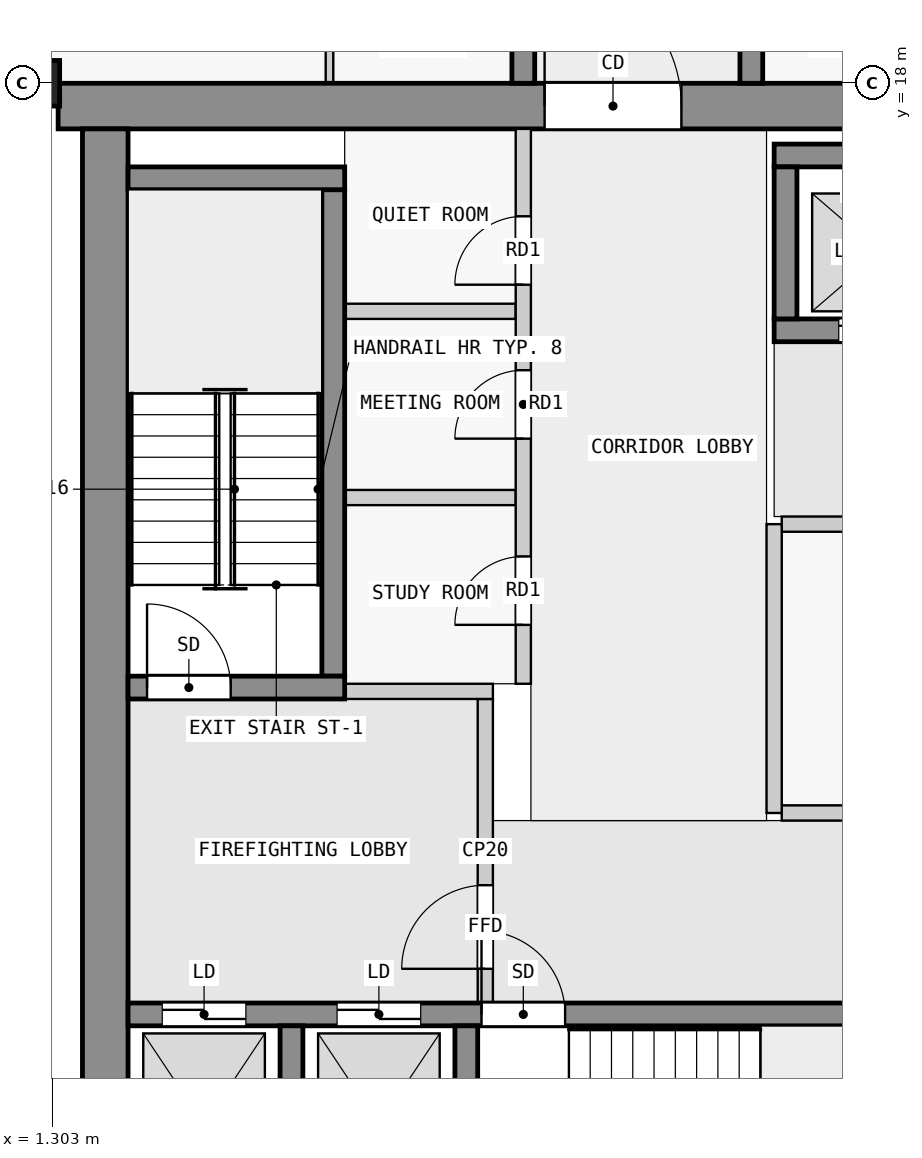
"""IFC4 building model, lengths in metres.
Left out: names, types, materials, properties, quantities, classifications, styles, units other than length and angle.
Written with IfcOpenShell. Run it as: python <this file> out.ifc"""

import sys

from ifc_helpers import new_model, si_unit, direction, frame, frame_2d, origin, origin_2d, place, context, subcontext, project, spatial, rectangle, extrude, element, fill, save


model = new_model("IFC4")
c1 = context("Model", 3, precision=1e-05, world=origin(), true_north=direction((0.0, 1.0)))
c2 = subcontext(c1, "Body", "Model", "MODEL_VIEW")
j1 = project(units=[si_unit("LENGTHUNIT", "METRE"), si_unit("PLANEANGLEUNIT", "RADIAN")], contexts=[c1])
p1 = place(None, origin())
s1 = spatial("IfcSite", under=j1, at=p1, CompositionType="ELEMENT")
p2 = place(p1, origin())
s2 = spatial("IfcBuilding", under=s1, at=p2, CompositionType="ELEMENT")
p3 = place(p2, frame((0.0, 0.0, 170.9)))
s3 = spatial("IfcBuildingStorey", under=s2, at=p3, CompositionType="ELEMENT", Elevation=170.9)
p4 = place(p3, frame((0.7, 18.0, 0.0), z_axis=(0.0, 0.0, 1.0), x_axis=(0.0, 1.0, 0.0)))
e1 = element("IfcColumn", 1, at=p4, inside=s3, PredefinedType="COLUMN", context=c2, shape_type="SweptSolid", body=[
    extrude(rectangle(XDim=0.6, YDim=1.4, at=origin_2d()), origin(), (0.0, 0.0, 1.0), 3.5),
])
p5 = place(p3, frame((1.38, 17.7, 0.0), z_axis=(0.0, 0.0, 1.0), x_axis=(1.0, 0.0, 0.0)))
e2 = element("IfcWall", 2, at=p5, inside=s3, PredefinedType="SHEAR", context=c2, shape_type="SweptSolid", body=[
    extrude(rectangle(XDim=21.12, YDim=0.6, at=frame_2d((10.56, 0.0))), origin(), (0.0, 0.0, 1.0), 3.25),
])
p6 = place(p5, frame((6.4, 0.0, 0.0)))
e3 = element("IfcOpeningElement", 3, at=p6, cuts=e2, PredefinedType="OPENING", context=c2, shape_type="SweptSolid", body=[
    extrude(rectangle(XDim=1.8, YDim=2.1, at=frame_2d((0.9, 1.05))), frame((0.0, 0.31, 0.0), z_axis=(0.0, -1.0, 0.0), x_axis=(1.0, 0.0, 0.0)), (0.0, 0.0, 1.0), 0.62),
])
p7 = place(p3, frame((2.0, 2.5, 0.0), z_axis=(0.0, 0.0, 1.0), x_axis=(0.0, 1.0, 0.0)))
e4 = element("IfcWall", 4, at=p7, inside=s3, PredefinedType="SHEAR", context=c2, shape_type="SweptSolid", body=[
    extrude(rectangle(XDim=14.9, YDim=0.6, at=frame_2d((7.45, 0.0))), origin(), (0.0, 0.0, 1.0), 3.25),
])
for number, where, z_axis, x_axis in (
    (5, (4.45, 2.8, 0.0), (0.0, 0.0, 1.0), (0.0, 1.0, 0.0)),
    (6, (6.75, 2.8, 0.0), (0.0, 0.0, 1.0), (0.0, 1.0, 0.0)),
):
    element("IfcWall", number, at=place(p3, frame(where, z_axis=z_axis, x_axis=x_axis)), inside=s3, PredefinedType="SHEAR", context=c2, shape_type="SweptSolid", body=[
        extrude(rectangle(XDim=2.8, YDim=0.3, at=frame_2d((1.4, 0.0))), origin(), (0.0, 0.0, 1.0), 3.25),
    ])
p8 = place(p3, frame((2.3, 5.75, 0.0), z_axis=(0.0, 0.0, 1.0), x_axis=(1.0, 0.0, 0.0)))
e7 = element("IfcWall", 7, at=p8, inside=s3, PredefinedType="SHEAR", context=c2, shape_type="SweptSolid", body=[
    extrude(rectangle(XDim=18.8, YDim=0.3, at=frame_2d((9.4, 0.0))), origin(), (0.0, 0.0, 1.0), 3.25),
])
p9 = place(p8, frame((4.65, 0.0, 0.0)))
e8 = element("IfcOpeningElement", 8, at=p9, cuts=e7, PredefinedType="OPENING", context=c2, shape_type="SweptSolid", body=[
    extrude(rectangle(XDim=1.1, YDim=2.1, at=frame_2d((0.55, 1.05))), frame((0.0, 0.16, 0.0), z_axis=(0.0, -1.0, 0.0), x_axis=(1.0, 0.0, 0.0)), (0.0, 0.0, 1.0), 0.32),
])
p10 = place(p8, frame((0.45, 0.0, 0.0)))
e9 = element("IfcOpeningElement", 9, at=p10, cuts=e7, PredefinedType="OPENING", context=c2, shape_type="SweptSolid", body=[
    extrude(rectangle(XDim=1.1, YDim=2.1, at=frame_2d((0.55, 1.05))), frame((0.0, 0.16, 0.0), z_axis=(0.0, -1.0, 0.0), x_axis=(1.0, 0.0, 0.0)), (0.0, 0.0, 1.0), 0.32),
])
p11 = place(p8, frame((2.75, 0.0, 0.0)))
e10 = element("IfcOpeningElement", 10, at=p11, cuts=e7, PredefinedType="OPENING", context=c2, shape_type="SweptSolid", body=[
    extrude(rectangle(XDim=1.1, YDim=2.1, at=frame_2d((0.55, 1.05))), frame((0.0, 0.16, 0.0), z_axis=(0.0, -1.0, 0.0), x_axis=(1.0, 0.0, 0.0)), (0.0, 0.0, 1.0), 0.32),
])
p12 = place(p8, frame((13.2, 0.0, 0.0)))
e11 = element("IfcOpeningElement", 11, at=p12, cuts=e7, PredefinedType="OPENING", context=c2, shape_type="SweptSolid", body=[
    extrude(rectangle(XDim=0.9, YDim=2.1, at=frame_2d((0.45, 1.05))), frame((0.0, 0.16, 0.0), z_axis=(0.0, -1.0, 0.0), x_axis=(1.0, 0.0, 0.0)), (0.0, 0.0, 1.0), 0.32),
])
p13 = place(p8, frame((16.95, 0.0, 0.0)))
e12 = element("IfcOpeningElement", 12, at=p13, cuts=e7, PredefinedType="OPENING", context=c2, shape_type="SweptSolid", body=[
    extrude(rectangle(XDim=0.9, YDim=2.1, at=frame_2d((0.45, 1.05))), frame((0.0, 0.16, 0.0), z_axis=(0.0, -1.0, 0.0), x_axis=(1.0, 0.0, 0.0)), (0.0, 0.0, 1.0), 0.32),
])
p14 = place(p3, frame((2.3, 10.05, 0.0), z_axis=(0.0, 0.0, 1.0), x_axis=(1.0, 0.0, 0.0)))
e13 = element("IfcWall", 13, at=p14, inside=s3, PredefinedType="SHEAR", context=c2, shape_type="SweptSolid", body=[
    extrude(rectangle(XDim=2.85, YDim=0.3, at=frame_2d((1.425, 0.0))), origin(), (0.0, 0.0, 1.0), 3.25),
])
p15 = place(p14, frame((0.25, 0.0, 0.0)))
e14 = element("IfcOpeningElement", 14, at=p15, cuts=e13, PredefinedType="OPENING", context=c2, shape_type="SweptSolid", body=[
    extrude(rectangle(XDim=1.1, YDim=2.1, at=frame_2d((0.55, 1.05))), frame((0.0, 0.16, 0.0), z_axis=(0.0, -1.0, 0.0), x_axis=(1.0, 0.0, 0.0)), (0.0, 0.0, 1.0), 0.32),
])
p16 = place(p3, frame((5.0, 10.2, 0.0), z_axis=(0.0, 0.0, 1.0), x_axis=(0.0, 1.0, 0.0)))
e15 = element("IfcWall", 15, at=p16, inside=s3, PredefinedType="SHEAR", context=c2, shape_type="SweptSolid", body=[
    extrude(rectangle(XDim=6.4, YDim=0.3, at=frame_2d((3.2, 0.0))), origin(), (0.0, 0.0, 1.0), 3.25),
])
p17 = place(p3, frame((2.3, 16.75, 0.0), z_axis=(0.0, 0.0, 1.0), x_axis=(1.0, 0.0, 0.0)))
e16 = element("IfcWall", 16, at=p17, inside=s3, PredefinedType="SHEAR", context=c2, shape_type="SweptSolid", body=[
    extrude(rectangle(XDim=2.85, YDim=0.3, at=frame_2d((1.425, 0.0))), origin(), (0.0, 0.0, 1.0), 3.25),
])
p18 = place(p3, frame((10.8, 17.05, 0.0), z_axis=(0.0, 0.0, 1.0), x_axis=(1.0, 0.0, 0.0)))
e17 = element("IfcWall", 17, at=p18, inside=s3, PredefinedType="SHEAR", context=c2, shape_type="SweptSolid", body=[
    extrude(rectangle(XDim=7.8, YDim=0.3, at=frame_2d((3.9, 0.0))), origin(), (0.0, 0.0, 1.0), 3.25),
])
p19 = place(p3, frame((10.8, 14.75, 0.0), z_axis=(0.0, 0.0, 1.0), x_axis=(1.0, 0.0, 0.0)))
e18 = element("IfcWall", 18, at=p19, inside=s3, PredefinedType="SHEAR", context=c2, shape_type="SweptSolid", body=[
    extrude(rectangle(XDim=7.8, YDim=0.3, at=frame_2d((3.9, 0.0))), origin(), (0.0, 0.0, 1.0), 3.25),
])
p20 = place(p19, frame((0.85, 0.0, 0.0)))
e19 = element("IfcOpeningElement", 19, at=p20, cuts=e18, PredefinedType="OPENING", context=c2, shape_type="SweptSolid", body=[
    extrude(rectangle(XDim=1.1, YDim=2.1, at=frame_2d((0.55, 1.05))), frame((0.0, 0.16, 0.0), z_axis=(0.0, -1.0, 0.0), x_axis=(1.0, 0.0, 0.0)), (0.0, 0.0, 1.0), 0.32),
])
p21 = place(p19, frame((3.35, 0.0, 0.0)))
e20 = element("IfcOpeningElement", 20, at=p21, cuts=e18, PredefinedType="OPENING", context=c2, shape_type="SweptSolid", body=[
    extrude(rectangle(XDim=1.1, YDim=2.1, at=frame_2d((0.55, 1.05))), frame((0.0, 0.16, 0.0), z_axis=(0.0, -1.0, 0.0), x_axis=(1.0, 0.0, 0.0)), (0.0, 0.0, 1.0), 0.32),
])
p22 = place(p19, frame((5.85, 0.0, 0.0)))
e21 = element("IfcOpeningElement", 21, at=p22, cuts=e18, PredefinedType="OPENING", context=c2, shape_type="SweptSolid", body=[
    extrude(rectangle(XDim=1.1, YDim=2.1, at=frame_2d((0.55, 1.05))), frame((0.0, 0.16, 0.0), z_axis=(0.0, -1.0, 0.0), x_axis=(1.0, 0.0, 0.0)), (0.0, 0.0, 1.0), 0.32),
])
p23 = place(p3, frame((10.95, 14.9, 0.0), z_axis=(0.0, 0.0, 1.0), x_axis=(0.0, 1.0, 0.0)))
e22 = element("IfcWall", 22, at=p23, inside=s3, PredefinedType="SHEAR", context=c2, shape_type="SweptSolid", body=[
    extrude(rectangle(XDim=2.0, YDim=0.3, at=frame_2d((1.0, 0.0))), origin(), (0.0, 0.0, 1.0), 3.25),
])
p24 = place(p3, frame((7.5, 18.0, 0.0), z_axis=(0.0, 0.0, 1.0), x_axis=(0.0, 1.0, 0.0)))
e23 = element("IfcWall", 23, at=p24, inside=s3, PredefinedType="SHEAR", context=c2, shape_type="SweptSolid", body=[
    extrude(rectangle(XDim=27.0, YDim=0.3, at=frame_2d((13.5, 0.0))), origin(), (0.0, 0.0, 1.0), 3.25),
])
p25 = place(p24, frame((1.75, 0.0, 0.0)))
e24 = element("IfcOpeningElement", 24, at=p25, cuts=e23, PredefinedType="OPENING", context=c2, shape_type="SweptSolid", body=[
    extrude(rectangle(XDim=1.0, YDim=2.1, at=frame_2d((0.5, 1.05))), frame((0.0, 0.16, 0.0), z_axis=(0.0, -1.0, 0.0), x_axis=(1.0, 0.0, 0.0)), (0.0, 0.0, 1.0), 0.32),
])
p26 = place(p24, frame((5.85, 0.0, 0.0)))
e25 = element("IfcOpeningElement", 25, at=p26, cuts=e23, PredefinedType="OPENING", context=c2, shape_type="SweptSolid", body=[
    extrude(rectangle(XDim=1.8, YDim=2.1, at=frame_2d((0.9, 1.05))), frame((0.0, 0.16, 0.0), z_axis=(0.0, -1.0, 0.0), x_axis=(1.0, 0.0, 0.0)), (0.0, 0.0, 1.0), 0.32),
])
p27 = place(p24, frame((13.05, 0.0, 0.0)))
e26 = element("IfcOpeningElement", 26, at=p27, cuts=e23, PredefinedType="OPENING", context=c2, shape_type="SweptSolid", body=[
    extrude(rectangle(XDim=1.0, YDim=2.1, at=frame_2d((0.5, 1.05))), frame((0.0, 0.16, 0.0), z_axis=(0.0, -1.0, 0.0), x_axis=(1.0, 0.0, 0.0)), (0.0, 0.0, 1.0), 0.32),
])
p28 = place(p24, frame((21.35, 0.0, 0.0)))
e27 = element("IfcOpeningElement", 27, at=p28, cuts=e23, PredefinedType="OPENING", context=c2, shape_type="SweptSolid", body=[
    extrude(rectangle(XDim=1.0, YDim=2.1, at=frame_2d((0.5, 1.05))), frame((0.0, 0.16, 0.0), z_axis=(0.0, -1.0, 0.0), x_axis=(1.0, 0.0, 0.0)), (0.0, 0.0, 1.0), 0.32),
])
p29 = place(p3, frame((10.5, 18.0, 0.0), z_axis=(0.0, 0.0, 1.0), x_axis=(0.0, 1.0, 0.0)))
e28 = element("IfcWall", 28, at=p29, inside=s3, PredefinedType="SHEAR", context=c2, shape_type="SweptSolid", body=[
    extrude(rectangle(XDim=27.0, YDim=0.3, at=frame_2d((13.5, 0.0))), origin(), (0.0, 0.0, 1.0), 3.25),
])
p30 = place(p29, frame((1.75, 0.0, 0.0)))
e29 = element("IfcOpeningElement", 29, at=p30, cuts=e28, PredefinedType="OPENING", context=c2, shape_type="SweptSolid", body=[
    extrude(rectangle(XDim=1.0, YDim=2.1, at=frame_2d((0.5, 1.05))), frame((0.0, 0.16, 0.0), z_axis=(0.0, -1.0, 0.0), x_axis=(1.0, 0.0, 0.0)), (0.0, 0.0, 1.0), 0.32),
])
p31 = place(p29, frame((6.25, 0.0, 0.0)))
e30 = element("IfcOpeningElement", 30, at=p31, cuts=e28, PredefinedType="OPENING", context=c2, shape_type="SweptSolid", body=[
    extrude(rectangle(XDim=1.0, YDim=2.1, at=frame_2d((0.5, 1.05))), frame((0.0, 0.16, 0.0), z_axis=(0.0, -1.0, 0.0), x_axis=(1.0, 0.0, 0.0)), (0.0, 0.0, 1.0), 0.32),
])
p32 = place(p29, frame((10.75, 0.0, 0.0)))
e31 = element("IfcOpeningElement", 31, at=p32, cuts=e28, PredefinedType="OPENING", context=c2, shape_type="SweptSolid", body=[
    extrude(rectangle(XDim=1.0, YDim=2.1, at=frame_2d((0.5, 1.05))), frame((0.0, 0.16, 0.0), z_axis=(0.0, -1.0, 0.0), x_axis=(1.0, 0.0, 0.0)), (0.0, 0.0, 1.0), 0.32),
])
p33 = place(p29, frame((15.25, 0.0, 0.0)))
e32 = element("IfcOpeningElement", 32, at=p33, cuts=e28, PredefinedType="OPENING", context=c2, shape_type="SweptSolid", body=[
    extrude(rectangle(XDim=1.0, YDim=2.1, at=frame_2d((0.5, 1.05))), frame((0.0, 0.16, 0.0), z_axis=(0.0, -1.0, 0.0), x_axis=(1.0, 0.0, 0.0)), (0.0, 0.0, 1.0), 0.32),
])
p34 = place(p29, frame((19.75, 0.0, 0.0)))
e33 = element("IfcOpeningElement", 33, at=p34, cuts=e28, PredefinedType="OPENING", context=c2, shape_type="SweptSolid", body=[
    extrude(rectangle(XDim=1.0, YDim=2.1, at=frame_2d((0.5, 1.05))), frame((0.0, 0.16, 0.0), z_axis=(0.0, -1.0, 0.0), x_axis=(1.0, 0.0, 0.0)), (0.0, 0.0, 1.0), 0.32),
])
p35 = place(p29, frame((23.25, 0.0, 0.0)))
e34 = element("IfcOpeningElement", 34, at=p35, cuts=e28, PredefinedType="OPENING", context=c2, shape_type="SweptSolid", body=[
    extrude(rectangle(XDim=0.9, YDim=2.1, at=frame_2d((0.45, 1.05))), frame((0.0, 0.16, 0.0), z_axis=(0.0, -1.0, 0.0), x_axis=(1.0, 0.0, 0.0)), (0.0, 0.0, 1.0), 0.32),
])
p36 = place(p29, frame((25.45, 0.0, 0.0)))
e35 = element("IfcOpeningElement", 35, at=p36, cuts=e28, PredefinedType="OPENING", context=c2, shape_type="SweptSolid", body=[
    extrude(rectangle(XDim=1.0, YDim=2.1, at=frame_2d((0.5, 1.05))), frame((0.0, 0.16, 0.0), z_axis=(0.0, -1.0, 0.0), x_axis=(1.0, 0.0, 0.0)), (0.0, 0.0, 1.0), 0.32),
])
p37 = place(p3, frame((7.0, 5.9, 0.0), z_axis=(0.0, 0.0, 1.0), x_axis=(0.0, 1.0, 0.0)))
e36 = element("IfcWall", 36, at=p37, inside=s3, PredefinedType="PARTITIONING", context=c2, shape_type="SweptSolid", body=[
    extrude(rectangle(XDim=4.0, YDim=0.2, at=frame_2d((2.0, 0.0))), origin(), (0.0, 0.0, 1.0), 3.25),
])
p38 = place(p37, frame((0.45, 0.0, 0.0)))
e37 = element("IfcOpeningElement", 37, at=p38, cuts=e36, PredefinedType="OPENING", context=c2, shape_type="SweptSolid", body=[
    extrude(rectangle(XDim=1.1, YDim=2.1, at=frame_2d((0.55, 1.05))), frame((0.0, 0.11, 0.0), z_axis=(0.0, -1.0, 0.0), x_axis=(1.0, 0.0, 0.0)), (0.0, 0.0, 1.0), 0.22),
])
p39 = place(p3, frame((5.15, 10.0, 0.0), z_axis=(0.0, 0.0, 1.0), x_axis=(1.0, 0.0, 0.0)))
e38 = element("IfcWall", 38, at=p39, inside=s3, PredefinedType="PARTITIONING", context=c2, shape_type="SweptSolid", body=[
    extrude(rectangle(XDim=1.95, YDim=0.2, at=frame_2d((0.975, 0.0))), origin(), (0.0, 0.0, 1.0), 3.25),
])
p40 = place(p3, frame((10.8, 8.4, 0.0), z_axis=(0.0, 0.0, 1.0), x_axis=(0.0, 1.0, 0.0)))
e39 = element("IfcWall", 39, at=p40, inside=s3, PredefinedType="PARTITIONING", context=c2, shape_type="SweptSolid", body=[
    extrude(rectangle(XDim=3.8, YDim=0.2, at=frame_2d((1.9, 0.0))), origin(), (0.0, 0.0, 1.0), 3.25),
])
p41 = place(p3, frame((10.9, 8.4, 0.0), z_axis=(0.0, 0.0, 1.0), x_axis=(1.0, 0.0, 0.0)))
e40 = element("IfcWall", 40, at=p41, inside=s3, PredefinedType="PARTITIONING", context=c2, shape_type="SweptSolid", body=[
    extrude(rectangle(XDim=8.5, YDim=0.2, at=frame_2d((4.25, 0.0))), origin(), (0.0, 0.0, 1.0), 3.25),
])
p42 = place(p3, frame((10.9, 12.2, 0.0), z_axis=(0.0, 0.0, 1.0), x_axis=(1.0, 0.0, 0.0)))
e41 = element("IfcWall", 41, at=p42, inside=s3, PredefinedType="PARTITIONING", context=c2, shape_type="SweptSolid", body=[
    extrude(rectangle(XDim=8.5, YDim=0.2, at=frame_2d((4.25, 0.0))), origin(), (0.0, 0.0, 1.0), 3.25),
])
p43 = place(p42, frame((3.8, 0.0, 0.0)))
e42 = element("IfcOpeningElement", 42, at=p43, cuts=e41, PredefinedType="OPENING", context=c2, shape_type="SweptSolid", body=[
    extrude(rectangle(XDim=0.9, YDim=2.1, at=frame_2d((0.45, 1.05))), frame((0.0, 0.11, 0.0), z_axis=(0.0, -1.0, 0.0), x_axis=(1.0, 0.0, 0.0)), (0.0, 0.0, 1.0), 0.22),
])
p44 = place(p3, frame((7.5, 10.1, 0.0), z_axis=(0.0, 0.0, 1.0), x_axis=(0.0, 1.0, 0.0)))
e43 = element("IfcWall", 43, at=p44, inside=s3, PredefinedType="PARTITIONING", context=c2, shape_type="SweptSolid", body=[
    extrude(rectangle(XDim=7.3, YDim=0.2, at=frame_2d((3.65, 0.0))), origin(), (0.0, 0.0, 1.0), 3.25),
])
p45 = place(p44, frame((0.775, 0.0, 0.0)))
e44 = element("IfcOpeningElement", 44, at=p45, cuts=e43, PredefinedType="OPENING", context=c2, shape_type="SweptSolid", body=[
    extrude(rectangle(XDim=0.9, YDim=2.1, at=frame_2d((0.45, 1.05))), frame((0.0, 0.11, 0.0), z_axis=(0.0, -1.0, 0.0), x_axis=(1.0, 0.0, 0.0)), (0.0, 0.0, 1.0), 0.22),
])
p46 = place(p44, frame((3.225, 0.0, 0.0)))
e45 = element("IfcOpeningElement", 45, at=p46, cuts=e43, PredefinedType="OPENING", context=c2, shape_type="SweptSolid", body=[
    extrude(rectangle(XDim=0.9, YDim=2.1, at=frame_2d((0.45, 1.05))), frame((0.0, 0.11, 0.0), z_axis=(0.0, -1.0, 0.0), x_axis=(1.0, 0.0, 0.0)), (0.0, 0.0, 1.0), 0.22),
])
p47 = place(p44, frame((5.25, 0.0, 0.0)))
e46 = element("IfcOpeningElement", 46, at=p47, cuts=e43, PredefinedType="OPENING", context=c2, shape_type="SweptSolid", body=[
    extrude(rectangle(XDim=0.9, YDim=2.1, at=frame_2d((0.45, 1.05))), frame((0.0, 0.11, 0.0), z_axis=(0.0, -1.0, 0.0), x_axis=(1.0, 0.0, 0.0)), (0.0, 0.0, 1.0), 0.22),
])
for number, where, z_axis, x_axis in (
    (47, (5.15, 12.55, 0.0), (0.0, 0.0, 1.0), (1.0, 0.0, 0.0)),
    (48, (5.15, 15.0, 0.0), (0.0, 0.0, 1.0), (1.0, 0.0, 0.0)),
):
    element("IfcWall", number, at=place(p3, frame(where, z_axis=z_axis, x_axis=x_axis)), inside=s3, PredefinedType="PARTITIONING", context=c2, shape_type="SweptSolid", body=[
        extrude(rectangle(XDim=2.25, YDim=0.2, at=frame_2d((1.125, 0.0))), origin(), (0.0, 0.0, 1.0), 3.25),
    ])
p48 = place(p3, frame((4.95, 19.45, 0.0), z_axis=(0.0, 0.0, 1.0), x_axis=(0.0, -1.0, 0.0)))
e49 = element("IfcWall", 49, at=p48, inside=s3, PredefinedType="PARTITIONING", context=c2, shape_type="SweptSolid", body=[
    extrude(rectangle(XDim=1.45, YDim=0.1, at=frame_2d((0.725, 0.0))), origin(), (0.0, 0.0, 1.0), 3.25),
])
p49 = place(p38, origin())
e50 = element("IfcDoor", 50, at=p49, inside=s3, OperationType="SINGLE_SWING_LEFT", PredefinedType="DOOR", context=c2, shape_type="SweptSolid", body=[
    extrude(rectangle(XDim=1.1, YDim=2.1, at=frame_2d((0.55, 1.05))), frame((0.0, 0.025, 0.0), z_axis=(0.0, -1.0, 0.0), x_axis=(1.0, 0.0, 0.0)), (0.0, 0.0, 1.0), 0.05),
])
fill(e37, e50)
p50 = place(p15, origin())
e51 = element("IfcDoor", 51, at=p50, inside=s3, OperationType="SINGLE_SWING_RIGHT", PredefinedType="DOOR", context=c2, shape_type="SweptSolid", body=[
    extrude(rectangle(XDim=1.1, YDim=2.1, at=frame_2d((0.55, 1.05))), frame((0.0, 0.025, 0.0), z_axis=(0.0, -1.0, 0.0), x_axis=(1.0, 0.0, 0.0)), (0.0, 0.0, 1.0), 0.05),
])
fill(e14, e51)
p51 = place(p9, origin())
e52 = element("IfcDoor", 52, at=p51, inside=s3, OperationType="SINGLE_SWING_LEFT", PredefinedType="DOOR", context=c2, shape_type="SweptSolid", body=[
    extrude(rectangle(XDim=1.1, YDim=2.1, at=frame_2d((0.55, 1.05))), frame((0.0, 0.025, 0.0), z_axis=(0.0, -1.0, 0.0), x_axis=(1.0, 0.0, 0.0)), (0.0, 0.0, 1.0), 0.05),
])
fill(e8, e52)
p52 = place(p10, origin())
e53 = element("IfcDoor", 53, at=p52, inside=s3, OperationType="DOUBLE_DOOR_SLIDING", PredefinedType="DOOR", context=c2, shape_type="SweptSolid", body=[
    extrude(rectangle(XDim=1.1, YDim=2.1, at=frame_2d((0.55, 1.05))), frame((0.0, 0.025, 0.0), z_axis=(0.0, -1.0, 0.0), x_axis=(1.0, 0.0, 0.0)), (0.0, 0.0, 1.0), 0.05),
])
fill(e9, e53)
p53 = place(p11, origin())
e54 = element("IfcDoor", 54, at=p53, inside=s3, OperationType="DOUBLE_DOOR_SLIDING", PredefinedType="DOOR", context=c2, shape_type="SweptSolid", body=[
    extrude(rectangle(XDim=1.1, YDim=2.1, at=frame_2d((0.55, 1.05))), frame((0.0, 0.025, 0.0), z_axis=(0.0, -1.0, 0.0), x_axis=(1.0, 0.0, 0.0)), (0.0, 0.0, 1.0), 0.05),
])
fill(e10, e54)
p54 = place(p20, origin())
e55 = element("IfcDoor", 55, at=p54, inside=s3, OperationType="DOUBLE_DOOR_SLIDING", PredefinedType="DOOR", context=c2, shape_type="SweptSolid", body=[
    extrude(rectangle(XDim=1.1, YDim=2.1, at=frame_2d((0.55, 1.05))), frame((0.0, 0.025, 0.0), z_axis=(0.0, -1.0, 0.0), x_axis=(1.0, 0.0, 0.0)), (0.0, 0.0, 1.0), 0.05),
])
fill(e19, e55)
p55 = place(p6, origin())
e56 = element("IfcDoor", 56, at=p55, inside=s3, OperationType="DOUBLE_DOOR_SINGLE_SWING", PredefinedType="DOOR", context=c2, shape_type="SweptSolid", body=[
    extrude(rectangle(XDim=1.8, YDim=2.1, at=frame_2d((0.9, 1.05))), frame((0.0, 0.025, 0.0), z_axis=(0.0, -1.0, 0.0), x_axis=(1.0, 0.0, 0.0)), (0.0, 0.0, 1.0), 0.05),
])
fill(e3, e56)
p56 = place(p45, origin())
e57 = element("IfcDoor", 57, at=p56, inside=s3, OperationType="SINGLE_SWING_RIGHT", PredefinedType="DOOR", context=c2, shape_type="SweptSolid", body=[
    extrude(rectangle(XDim=0.9, YDim=2.1, at=frame_2d((0.45, 1.05))), frame((0.0, 0.025, 0.0), z_axis=(0.0, -1.0, 0.0), x_axis=(1.0, 0.0, 0.0)), (0.0, 0.0, 1.0), 0.05),
])
fill(e44, e57)
p57 = place(p46, origin())
e58 = element("IfcDoor", 58, at=p57, inside=s3, OperationType="SINGLE_SWING_RIGHT", PredefinedType="DOOR", context=c2, shape_type="SweptSolid", body=[
    extrude(rectangle(XDim=0.9, YDim=2.1, at=frame_2d((0.45, 1.05))), frame((0.0, 0.025, 0.0), z_axis=(0.0, -1.0, 0.0), x_axis=(1.0, 0.0, 0.0)), (0.0, 0.0, 1.0), 0.05),
])
fill(e45, e58)
p58 = place(p47, origin())
e59 = element("IfcDoor", 59, at=p58, inside=s3, OperationType="SINGLE_SWING_RIGHT", PredefinedType="DOOR", context=c2, shape_type="SweptSolid", body=[
    extrude(rectangle(XDim=0.9, YDim=2.1, at=frame_2d((0.45, 1.05))), frame((0.0, 0.025, 0.0), z_axis=(0.0, -1.0, 0.0), x_axis=(1.0, 0.0, 0.0)), (0.0, 0.0, 1.0), 0.05),
])
fill(e46, e59)
save(model, sys.argv[1])
